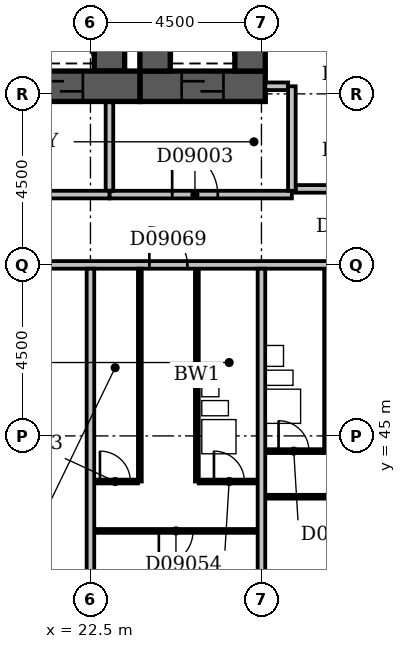
"""IFC4 building model, lengths in metres.
Left out: names, types, materials, properties, quantities, classifications, styles, units other than length and angle.
Written with IfcOpenShell. Run it as: python <this file> out.ifc"""

import sys

from ifc_helpers import new_model, si_unit, direction, frame, frame_2d, origin, place, context, subcontext, project, spatial, rectangle, extrude, element, fill, save


model = new_model("IFC4")
c1 = context("Model", 3, precision=1e-05, world=origin(), true_north=direction((0.0, 1.0)))
c2 = subcontext(c1, "Body", "Model", "MODEL_VIEW")
j1 = project(units=[si_unit("LENGTHUNIT", "METRE"), si_unit("PLANEANGLEUNIT", "RADIAN")], contexts=[c1])
p1 = place(None, origin())
s1 = spatial("IfcSite", under=j1, at=p1, CompositionType="ELEMENT")
p2 = place(p1, origin())
s2 = spatial("IfcBuilding", under=s1, at=p2, CompositionType="ELEMENT")
p3 = place(p2, frame((0.0, 0.0, 43.4)))
s3 = spatial("IfcBuildingStorey", under=s2, at=p3, CompositionType="ELEMENT", Elevation=43.4)
p4 = place(p3, frame((7.35, 54.2, -0.3), z_axis=(0.0, 0.0, 1.0), x_axis=(1.0, 0.0, 0.0)))
e1 = element("IfcWall", 1, at=p4, inside=s3, PredefinedType="SHEAR", context=c2, shape_type="SweptSolid", body=[
    extrude(rectangle(XDim=16.45, YDim=0.8, at=frame_2d((8.225, 0.0))), origin(), (0.0, 0.0, 1.0), 3.6),
])
p5 = place(p4, frame((1.35, 0.0, 0.3)))
e2 = element("IfcOpeningElement", 2, at=p5, cuts=e1, PredefinedType="OPENING", context=c2, shape_type="SweptSolid", body=[
    extrude(rectangle(XDim=1.1, YDim=2.1, at=frame_2d((0.55, 1.05))), frame((0.0, 0.412, 0.0), z_axis=(0.0, -1.0, 0.0), x_axis=(1.0, 0.0, 0.0)), (0.0, 0.0, 1.0), 0.824),
])
p6 = place(p4, frame((3.85, 0.0, 0.3)))
e3 = element("IfcOpeningElement", 3, at=p6, cuts=e1, PredefinedType="OPENING", context=c2, shape_type="SweptSolid", body=[
    extrude(rectangle(XDim=1.1, YDim=2.1, at=frame_2d((0.55, 1.05))), frame((0.0, 0.412, 0.0), z_axis=(0.0, -1.0, 0.0), x_axis=(1.0, 0.0, 0.0)), (0.0, 0.0, 1.0), 0.824),
])
p7 = place(p4, frame((6.35, 0.0, 0.3)))
e4 = element("IfcOpeningElement", 4, at=p7, cuts=e1, PredefinedType="OPENING", context=c2, shape_type="SweptSolid", body=[
    extrude(rectangle(XDim=1.1, YDim=2.1, at=frame_2d((0.55, 1.05))), frame((0.0, 0.412, 0.0), z_axis=(0.0, -1.0, 0.0), x_axis=(1.0, 0.0, 0.0)), (0.0, 0.0, 1.0), 0.824),
])
p8 = place(p4, frame((8.85, 0.0, 0.3)))
e5 = element("IfcOpeningElement", 5, at=p8, cuts=e1, PredefinedType="OPENING", context=c2, shape_type="SweptSolid", body=[
    extrude(rectangle(XDim=1.1, YDim=2.1, at=frame_2d((0.55, 1.05))), frame((0.0, 0.412, 0.0), z_axis=(0.0, -1.0, 0.0), x_axis=(1.0, 0.0, 0.0)), (0.0, 0.0, 1.0), 0.824),
])
p9 = place(p4, frame((11.35, 0.0, 0.3)))
e6 = element("IfcOpeningElement", 6, at=p9, cuts=e1, PredefinedType="OPENING", context=c2, shape_type="SweptSolid", body=[
    extrude(rectangle(XDim=1.1, YDim=2.1, at=frame_2d((0.55, 1.05))), frame((0.0, 0.412, 0.0), z_axis=(0.0, -1.0, 0.0), x_axis=(1.0, 0.0, 0.0)), (0.0, 0.0, 1.0), 0.824),
])
p10 = place(p4, frame((13.85, 0.0, 0.3)))
e7 = element("IfcOpeningElement", 7, at=p10, cuts=e1, PredefinedType="OPENING", context=c2, shape_type="SweptSolid", body=[
    extrude(rectangle(XDim=1.1, YDim=2.1, at=frame_2d((0.55, 1.05))), frame((0.0, 0.412, 0.0), z_axis=(0.0, -1.0, 0.0), x_axis=(1.0, 0.0, 0.0)), (0.0, 0.0, 1.0), 0.824),
])
p11 = place(p3, frame((23.0, 54.6, -0.3), z_axis=(0.0, 0.0, 1.0), x_axis=(0.0, 1.0, 0.0)))
e8 = element("IfcWall", 8, at=p11, inside=s3, PredefinedType="SHEAR", context=c2, shape_type="SweptSolid", body=[
    extrude(rectangle(XDim=3.0, YDim=0.8, at=frame_2d((1.5, 0.0))), origin(), (0.0, 0.0, 1.0), 3.6),
])
p12 = place(p3, frame((23.8, 54.2, -0.3), z_axis=(0.0, 0.0, 1.0), x_axis=(1.0, 0.0, 0.0)))
e9 = element("IfcWall", 9, at=p12, inside=s3, PredefinedType="SHEAR", context=c2, shape_type="SweptSolid", body=[
    extrude(rectangle(XDim=3.3, YDim=0.8, at=frame_2d((1.65, 0.0))), origin(), (0.0, 0.0, 1.0), 3.6),
])
p13 = place(p12, frame((1.1, 0.0, 0.3)))
e10 = element("IfcOpeningElement", 10, at=p13, cuts=e9, PredefinedType="OPENING", context=c2, shape_type="SweptSolid", body=[
    extrude(rectangle(XDim=1.1, YDim=2.1, at=frame_2d((0.55, 1.05))), frame((0.0, 0.412, 0.0), z_axis=(0.0, -1.0, 0.0), x_axis=(1.0, 0.0, 0.0)), (0.0, 0.0, 1.0), 0.824),
])
for number, where, z_axis, x_axis in (
    (11, (24.2, 54.6, -0.3), (0.0, 0.0, 1.0), (0.0, 1.0, 0.0)),
    (12, (26.7, 54.6, -0.3), (0.0, 0.0, 1.0), (0.0, 1.0, 0.0)),
):
    element("IfcWall", number, at=place(p3, frame(where, z_axis=z_axis, x_axis=x_axis)), inside=s3, PredefinedType="SHEAR", context=c2, shape_type="SweptSolid", body=[
        extrude(rectangle(XDim=3.0, YDim=0.8, at=frame_2d((1.5, 0.0))), origin(), (0.0, 0.0, 1.0), 3.6),
    ])
p14 = place(p3, frame((8.0, 51.35, 0.0), z_axis=(0.0, 0.0, 1.0), x_axis=(1.0, 0.0, 0.0)))
e13 = element("IfcWall", 13, at=p14, inside=s3, PredefinedType="PARTITIONING", context=c2, shape_type="SweptSolid", body=[
    extrude(rectangle(XDim=15.0, YDim=0.2, at=frame_2d((7.5, 0.0))), origin(), (0.0, 0.0, 1.0), 3.3),
])
p15 = place(p14, frame((3.4, 0.0, 0.0)))
e14 = element("IfcOpeningElement", 14, at=p15, cuts=e13, PredefinedType="OPENING", context=c2, shape_type="SweptSolid", body=[
    extrude(rectangle(XDim=1.2, YDim=2.1, at=frame_2d((0.6, 1.05))), frame((0.0, 0.112, 0.0), z_axis=(0.0, -1.0, 0.0), x_axis=(1.0, 0.0, 0.0)), (0.0, 0.0, 1.0), 0.224),
])
p16 = place(p14, frame((9.4, 0.0, 0.0)))
e15 = element("IfcOpeningElement", 15, at=p16, cuts=e13, PredefinedType="OPENING", context=c2, shape_type="SweptSolid", body=[
    extrude(rectangle(XDim=1.2, YDim=2.1, at=frame_2d((0.6, 1.05))), frame((0.0, 0.112, 0.0), z_axis=(0.0, -1.0, 0.0), x_axis=(1.0, 0.0, 0.0)), (0.0, 0.0, 1.0), 0.224),
])
p17 = place(p3, frame((23.0, 51.45, 0.0), z_axis=(0.0, 0.0, 1.0), x_axis=(0.0, 1.0, 0.0)))
e16 = element("IfcWall", 16, at=p17, inside=s3, PredefinedType="PARTITIONING", context=c2, shape_type="SweptSolid", body=[
    extrude(rectangle(XDim=2.33, YDim=0.2, at=frame_2d((1.165, 0.0))), origin(), (0.0, 0.0, 1.0), 3.3),
])
p18 = place(p3, frame((23.0, 51.35, 0.0), z_axis=(0.0, 0.0, 1.0), x_axis=(1.0, 0.0, 0.0)))
e17 = element("IfcWall", 17, at=p18, inside=s3, PredefinedType="PARTITIONING", context=c2, shape_type="SweptSolid", body=[
    extrude(rectangle(XDim=4.8, YDim=0.2, at=frame_2d((2.4, 0.0))), origin(), (0.0, 0.0, 1.0), 3.3),
])
p19 = place(p18, frame((1.65, 0.0, 0.0)))
e18 = element("IfcOpeningElement", 18, at=p19, cuts=e17, PredefinedType="OPENING", context=c2, shape_type="SweptSolid", body=[
    extrude(rectangle(XDim=1.2, YDim=2.1, at=frame_2d((0.6, 1.05))), frame((0.0, 0.112, 0.0), z_axis=(0.0, -1.0, 0.0), x_axis=(1.0, 0.0, 0.0)), (0.0, 0.0, 1.0), 0.224),
])
p20 = place(p3, frame((27.8, 51.45, 0.0), z_axis=(0.0, 0.0, 1.0), x_axis=(0.0, 1.0, 0.0)))
e19 = element("IfcWall", 19, at=p20, inside=s3, PredefinedType="PARTITIONING", context=c2, shape_type="SweptSolid", body=[
    extrude(rectangle(XDim=2.75, YDim=0.2, at=frame_2d((1.375, 0.0))), origin(), (0.0, 0.0, 1.0), 3.3),
])
p21 = place(p3, frame((27.1, 54.2, 0.0), z_axis=(0.0, 0.0, 1.0), x_axis=(1.0, 0.0, 0.0)))
e20 = element("IfcWall", 20, at=p21, inside=s3, PredefinedType="PARTITIONING", context=c2, shape_type="SweptSolid", body=[
    extrude(rectangle(XDim=0.6, YDim=0.2, at=frame_2d((0.3, 0.0))), origin(), (0.0, 0.0, 1.0), 3.3),
])
p22 = place(p3, frame((22.5, 36.6, 0.0), z_axis=(0.0, 0.0, 1.0), x_axis=(0.0, 1.0, 0.0)))
e21 = element("IfcWall", 21, at=p22, inside=s3, PredefinedType="PARTITIONING", context=c2, shape_type="SweptSolid", body=[
    extrude(rectangle(XDim=12.8, YDim=0.2, at=frame_2d((6.4, 0.0))), origin(), (0.0, 0.0, 1.0), 3.3),
])
p23 = place(p3, frame((27.0, 36.6, 0.0), z_axis=(0.0, 0.0, 1.0), x_axis=(0.0, 1.0, 0.0)))
e22 = element("IfcWall", 22, at=p23, inside=s3, PredefinedType="PARTITIONING", context=c2, shape_type="SweptSolid", body=[
    extrude(rectangle(XDim=12.8, YDim=0.2, at=frame_2d((6.4, 0.0))), origin(), (0.0, 0.0, 1.0), 2.6),
])
p24 = place(p3, frame((22.6, 42.5, 0.0), z_axis=(0.0, 0.0, 1.0), x_axis=(1.0, 0.0, 0.0)))
e23 = element("IfcWall", 23, at=p24, inside=s3, PredefinedType="PARTITIONING", context=c2, shape_type="SweptSolid", body=[
    extrude(rectangle(XDim=4.3, YDim=0.1, at=frame_2d((2.15, 0.0))), origin(), (0.0, 0.0, 1.0), 3.3),
])
p25 = place(p24, frame((1.7, 0.0, 0.0)))
e24 = element("IfcOpeningElement", 24, at=p25, cuts=e23, PredefinedType="OPENING", context=c2, shape_type="SweptSolid", body=[
    extrude(rectangle(XDim=0.9, YDim=2.1, at=frame_2d((0.45, 1.05))), frame((0.0, 0.062, 0.0), z_axis=(0.0, -1.0, 0.0), x_axis=(1.0, 0.0, 0.0)), (0.0, 0.0, 1.0), 0.124),
])
p26 = place(p3, frame((27.1, 43.4, 0.0), z_axis=(0.0, 0.0, 1.0), x_axis=(1.0, 0.0, 0.0)))
e25 = element("IfcWall", 25, at=p26, inside=s3, PredefinedType="PARTITIONING", context=c2, shape_type="SweptSolid", body=[
    extrude(rectangle(XDim=4.3, YDim=0.1, at=frame_2d((2.15, 0.0))), origin(), (0.0, 0.0, 1.0), 3.3),
])
p27 = place(p26, frame((1.7, 0.0, 0.0)))
e26 = element("IfcOpeningElement", 26, at=p27, cuts=e25, PredefinedType="OPENING", context=c2, shape_type="SweptSolid", body=[
    extrude(rectangle(XDim=0.9, YDim=2.1, at=frame_2d((0.45, 1.05))), frame((0.0, 0.062, 0.0), z_axis=(0.0, -1.0, 0.0), x_axis=(1.0, 0.0, 0.0)), (0.0, 0.0, 1.0), 0.124),
])
p28 = place(p3, frame((22.6, 43.8, 0.0), z_axis=(0.0, 0.0, 1.0), x_axis=(1.0, 0.0, 0.0)))
e27 = element("IfcWall", 27, at=p28, inside=s3, PredefinedType="PARTITIONING", context=c2, shape_type="SweptSolid", body=[
    extrude(rectangle(XDim=1.15, YDim=0.1, at=frame_2d((0.575, 0.0))), origin(), (0.0, 0.0, 1.0), 3.3),
])
p29 = place(p28, frame((0.15, 0.0, 0.0)))
e28 = element("IfcOpeningElement", 28, at=p29, cuts=e27, PredefinedType="OPENING", context=c2, shape_type="SweptSolid", body=[
    extrude(rectangle(XDim=0.8, YDim=2.1, at=frame_2d((0.4, 1.05))), frame((0.0, 0.062, 0.0), z_axis=(0.0, -1.0, 0.0), x_axis=(1.0, 0.0, 0.0)), (0.0, 0.0, 1.0), 0.124),
])
p30 = place(p3, frame((23.8, 43.8, 0.0), z_axis=(0.0, 0.0, 1.0), x_axis=(0.0, 1.0, 0.0)))
e29 = element("IfcWall", 29, at=p30, inside=s3, PredefinedType="PARTITIONING", context=c2, shape_type="SweptSolid", body=[
    extrude(rectangle(XDim=5.6, YDim=0.1, at=frame_2d((2.8, 0.0))), origin(), (0.0, 0.0, 1.0), 3.3),
])
p31 = place(p3, frame((25.3, 43.8, 0.0), z_axis=(0.0, 0.0, 1.0), x_axis=(0.0, 1.0, 0.0)))
e30 = element("IfcWall", 30, at=p31, inside=s3, PredefinedType="PLUMBINGWALL", context=c2, shape_type="SweptSolid", body=[
    extrude(rectangle(XDim=5.6, YDim=0.1, at=frame_2d((2.8, 0.0))), origin(), (0.0, 0.0, 1.0), 3.3),
])
p32 = place(p3, frame((25.35, 43.8, 0.0), z_axis=(0.0, 0.0, 1.0), x_axis=(1.0, 0.0, 0.0)))
e31 = element("IfcWall", 31, at=p32, inside=s3, PredefinedType="PARTITIONING", context=c2, shape_type="SweptSolid", body=[
    extrude(rectangle(XDim=1.55, YDim=0.1, at=frame_2d((0.775, 0.0))), origin(), (0.0, 0.0, 1.0), 3.3),
])
p33 = place(p32, frame((0.4, 0.0, 0.0)))
e32 = element("IfcOpeningElement", 32, at=p33, cuts=e31, PredefinedType="OPENING", context=c2, shape_type="SweptSolid", body=[
    extrude(rectangle(XDim=0.8, YDim=2.1, at=frame_2d((0.4, 1.05))), frame((0.0, 0.062, 0.0), z_axis=(0.0, -1.0, 0.0), x_axis=(1.0, 0.0, 0.0)), (0.0, 0.0, 1.0), 0.124),
])
p34 = place(p3, frame((27.1, 44.6, 0.0), z_axis=(0.0, 0.0, 1.0), x_axis=(1.0, 0.0, 0.0)))
e33 = element("IfcWall", 33, at=p34, inside=s3, PredefinedType="PARTITIONING", context=c2, shape_type="SweptSolid", body=[
    extrude(rectangle(XDim=1.55, YDim=0.1, at=frame_2d((0.775, 0.0))), origin(), (0.0, 0.0, 1.0), 3.3),
])
p35 = place(p34, frame((0.35, 0.0, 0.0)))
e34 = element("IfcOpeningElement", 34, at=p35, cuts=e33, PredefinedType="OPENING", context=c2, shape_type="SweptSolid", body=[
    extrude(rectangle(XDim=0.8, YDim=2.1, at=frame_2d((0.4, 1.05))), frame((0.0, 0.062, 0.0), z_axis=(0.0, -1.0, 0.0), x_axis=(1.0, 0.0, 0.0)), (0.0, 0.0, 1.0), 0.124),
])
p36 = place(p3, frame((28.7, 44.6, 0.0), z_axis=(0.0, 0.0, 1.0), x_axis=(0.0, 1.0, 0.0)))
e35 = element("IfcWall", 35, at=p36, inside=s3, PredefinedType="PLUMBINGWALL", context=c2, shape_type="SweptSolid", body=[
    extrude(rectangle(XDim=4.8, YDim=0.1, at=frame_2d((2.4, 0.0))), origin(), (0.0, 0.0, 1.0), 3.3),
])
p37 = place(p3, frame((9.1, 49.5, 0.0), z_axis=(0.0, 0.0, 1.0), x_axis=(1.0, 0.0, 0.0)))
e36 = element("IfcWall", 36, at=p37, inside=s3, PredefinedType="PARTITIONING", context=c2, shape_type="SweptSolid", body=[
    extrude(rectangle(XDim=57.8, YDim=0.2, at=frame_2d((28.9, 0.0))), origin(), (0.0, 0.0, 1.0), 3.3),
])
p38 = place(p37, frame((14.95, 0.0, 0.0)))
e37 = element("IfcOpeningElement", 37, at=p38, cuts=e36, PredefinedType="OPENING", context=c2, shape_type="SweptSolid", body=[
    extrude(rectangle(XDim=1.0, YDim=2.1, at=frame_2d((0.5, 1.05))), frame((0.0, 0.112, 0.0), z_axis=(0.0, -1.0, 0.0), x_axis=(1.0, 0.0, 0.0)), (0.0, 0.0, 1.0), 0.224),
])
p39 = place(p37, frame((19.85, 0.0, 0.0)))
e38 = element("IfcOpeningElement", 38, at=p39, cuts=e36, PredefinedType="OPENING", context=c2, shape_type="SweptSolid", body=[
    extrude(rectangle(XDim=1.0, YDim=2.1, at=frame_2d((0.5, 1.05))), frame((0.0, 0.112, 0.0), z_axis=(0.0, -1.0, 0.0), x_axis=(1.0, 0.0, 0.0)), (0.0, 0.0, 1.0), 0.224),
])
p40 = place(p37, frame((22.7, 0.0, 0.0)))
e39 = element("IfcOpeningElement", 39, at=p40, cuts=e36, PredefinedType="OPENING", context=c2, shape_type="SweptSolid", body=[
    extrude(rectangle(XDim=1.0, YDim=2.1, at=frame_2d((0.5, 1.05))), frame((0.0, 0.112, 0.0), z_axis=(0.0, -1.0, 0.0), x_axis=(1.0, 0.0, 0.0)), (0.0, 0.0, 1.0), 0.224),
])
p41 = place(p37, frame((33.35, 0.0, 0.0)))
e40 = element("IfcOpeningElement", 40, at=p41, cuts=e36, PredefinedType="OPENING", context=c2, shape_type="SweptSolid", body=[
    extrude(rectangle(XDim=1.0, YDim=2.1, at=frame_2d((0.5, 1.05))), frame((0.0, 0.112, 0.0), z_axis=(0.0, -1.0, 0.0), x_axis=(1.0, 0.0, 0.0)), (0.0, 0.0, 1.0), 0.224),
])
p42 = place(p37, frame((36.2, 0.0, 0.0)))
e41 = element("IfcOpeningElement", 41, at=p42, cuts=e36, PredefinedType="OPENING", context=c2, shape_type="SweptSolid", body=[
    extrude(rectangle(XDim=1.0, YDim=2.1, at=frame_2d((0.5, 1.05))), frame((0.0, 0.112, 0.0), z_axis=(0.0, -1.0, 0.0), x_axis=(1.0, 0.0, 0.0)), (0.0, 0.0, 1.0), 0.224),
])
p43 = place(p37, frame((54.15, 0.0, 0.0)))
e42 = element("IfcOpeningElement", 42, at=p43, cuts=e36, PredefinedType="OPENING", context=c2, shape_type="SweptSolid", body=[
    extrude(rectangle(XDim=1.0, YDim=2.1, at=frame_2d((0.5, 1.05))), frame((0.0, 0.112, 0.0), z_axis=(0.0, -1.0, 0.0), x_axis=(1.0, 0.0, 0.0)), (0.0, 0.0, 1.0), 0.224),
])
p44 = place(p37, frame((6.15, 0.0, 0.0)))
e43 = element("IfcOpeningElement", 43, at=p44, cuts=e36, PredefinedType="OPENING", context=c2, shape_type="SweptSolid", body=[
    extrude(rectangle(XDim=0.9, YDim=2.1, at=frame_2d((0.45, 1.05))), frame((0.0, 0.112, 0.0), z_axis=(0.0, -1.0, 0.0), x_axis=(1.0, 0.0, 0.0)), (0.0, 0.0, 1.0), 0.224),
])
p45 = place(p3, frame((27.9, 51.5, 0.0), z_axis=(0.0, 0.0, 1.0), x_axis=(1.0, 0.0, 0.0)))
e44 = element("IfcWall", 44, at=p45, inside=s3, PredefinedType="PARTITIONING", context=c2, shape_type="SweptSolid", body=[
    extrude(rectangle(XDim=9.3, YDim=0.2, at=frame_2d((4.65, 0.0))), origin(), (0.0, 0.0, 1.0), 3.3),
])
p46 = place(p45, frame((1.2, 0.0, 0.0)))
e45 = element("IfcOpeningElement", 45, at=p46, cuts=e44, PredefinedType="OPENING", context=c2, shape_type="SweptSolid", body=[
    extrude(rectangle(XDim=1.0, YDim=2.1, at=frame_2d((0.5, 1.05))), frame((0.0, 0.112, 0.0), z_axis=(0.0, -1.0, 0.0), x_axis=(1.0, 0.0, 0.0)), (0.0, 0.0, 1.0), 0.224),
])
p47 = place(p45, frame((6.0, 0.0, 0.0)))
e46 = element("IfcOpeningElement", 46, at=p47, cuts=e44, PredefinedType="OPENING", context=c2, shape_type="SweptSolid", body=[
    extrude(rectangle(XDim=0.9, YDim=2.1, at=frame_2d((0.45, 1.05))), frame((0.0, 0.112, 0.0), z_axis=(0.0, -1.0, 0.0), x_axis=(1.0, 0.0, 0.0)), (0.0, 0.0, 1.0), 0.224),
])
p48 = place(p19, origin())
e47 = element("IfcDoor", 47, at=p48, inside=s3, OperationType="SINGLE_SWING_LEFT", PredefinedType="DOOR", context=c2, shape_type="SweptSolid", body=[
    extrude(rectangle(XDim=1.2, YDim=2.1, at=frame_2d((0.6, 1.05))), frame((0.0, 0.025, 0.0), z_axis=(0.0, -1.0, 0.0), x_axis=(1.0, 0.0, 0.0)), (0.0, 0.0, 1.0), 0.05),
])
fill(e18, e47)
p49 = place(p13, origin())
e48 = element("IfcDoor", 48, at=p49, inside=s3, OperationType="SLIDING_TO_LEFT", PredefinedType="DOOR", context=c2, shape_type="SweptSolid", body=[
    extrude(rectangle(XDim=1.1, YDim=2.1, at=frame_2d((0.55, 1.05))), frame((0.0, 0.025, 0.0), z_axis=(0.0, -1.0, 0.0), x_axis=(1.0, 0.0, 0.0)), (0.0, 0.0, 1.0), 0.05),
])
fill(e10, e48)
p50 = place(p10, origin())
e49 = element("IfcDoor", 49, at=p50, inside=s3, OperationType="SLIDING_TO_LEFT", PredefinedType="DOOR", context=c2, shape_type="SweptSolid", body=[
    extrude(rectangle(XDim=1.1, YDim=2.1, at=frame_2d((0.55, 1.05))), frame((0.0, 0.025, 0.0), z_axis=(0.0, -1.0, 0.0), x_axis=(1.0, 0.0, 0.0)), (0.0, 0.0, 1.0), 0.05),
])
fill(e7, e49)
p51 = place(p25, frame((0.9, 0.0, 0.0), z_axis=(0.0, 0.0, 1.0), x_axis=(-1.0, 0.0, 0.0)))
e50 = element("IfcDoor", 50, at=p51, inside=s3, OperationType="SINGLE_SWING_RIGHT", PredefinedType="DOOR", context=c2, shape_type="SweptSolid", body=[
    extrude(rectangle(XDim=0.9, YDim=2.1, at=frame_2d((0.45, 1.05))), frame((0.0, 0.025, 0.0), z_axis=(0.0, -1.0, 0.0), x_axis=(1.0, 0.0, 0.0)), (0.0, 0.0, 1.0), 0.05),
])
fill(e24, e50)
p52 = place(p29, origin())
e51 = element("IfcDoor", 51, at=p52, inside=s3, OperationType="SINGLE_SWING_LEFT", PredefinedType="DOOR", context=c2, shape_type="SweptSolid", body=[
    extrude(rectangle(XDim=0.8, YDim=2.1, at=frame_2d((0.4, 1.05))), frame((0.0, 0.025, 0.0), z_axis=(0.0, -1.0, 0.0), x_axis=(1.0, 0.0, 0.0)), (0.0, 0.0, 1.0), 0.05),
])
fill(e28, e51)
p53 = place(p33, origin())
e52 = element("IfcDoor", 52, at=p53, inside=s3, OperationType="SINGLE_SWING_LEFT", PredefinedType="DOOR", context=c2, shape_type="SweptSolid", body=[
    extrude(rectangle(XDim=0.8, YDim=2.1, at=frame_2d((0.4, 1.05))), frame((0.0, 0.025, 0.0), z_axis=(0.0, -1.0, 0.0), x_axis=(1.0, 0.0, 0.0)), (0.0, 0.0, 1.0), 0.05),
])
fill(e32, e52)
p54 = place(p35, origin())
e53 = element("IfcDoor", 53, at=p54, inside=s3, OperationType="SINGLE_SWING_LEFT", PredefinedType="DOOR", context=c2, shape_type="SweptSolid", body=[
    extrude(rectangle(XDim=0.8, YDim=2.1, at=frame_2d((0.4, 1.05))), frame((0.0, 0.025, 0.0), z_axis=(0.0, -1.0, 0.0), x_axis=(1.0, 0.0, 0.0)), (0.0, 0.0, 1.0), 0.05),
])
fill(e34, e53)
p55 = place(p38, origin())
e54 = element("IfcDoor", 54, at=p55, inside=s3, OperationType="SINGLE_SWING_LEFT", PredefinedType="DOOR", context=c2, shape_type="SweptSolid", body=[
    extrude(rectangle(XDim=1.0, YDim=2.1, at=frame_2d((0.5, 1.05))), frame((0.0, 0.025, 0.0), z_axis=(0.0, -1.0, 0.0), x_axis=(1.0, 0.0, 0.0)), (0.0, 0.0, 1.0), 0.05),
])
fill(e37, e54)
save(model, sys.argv[1])
